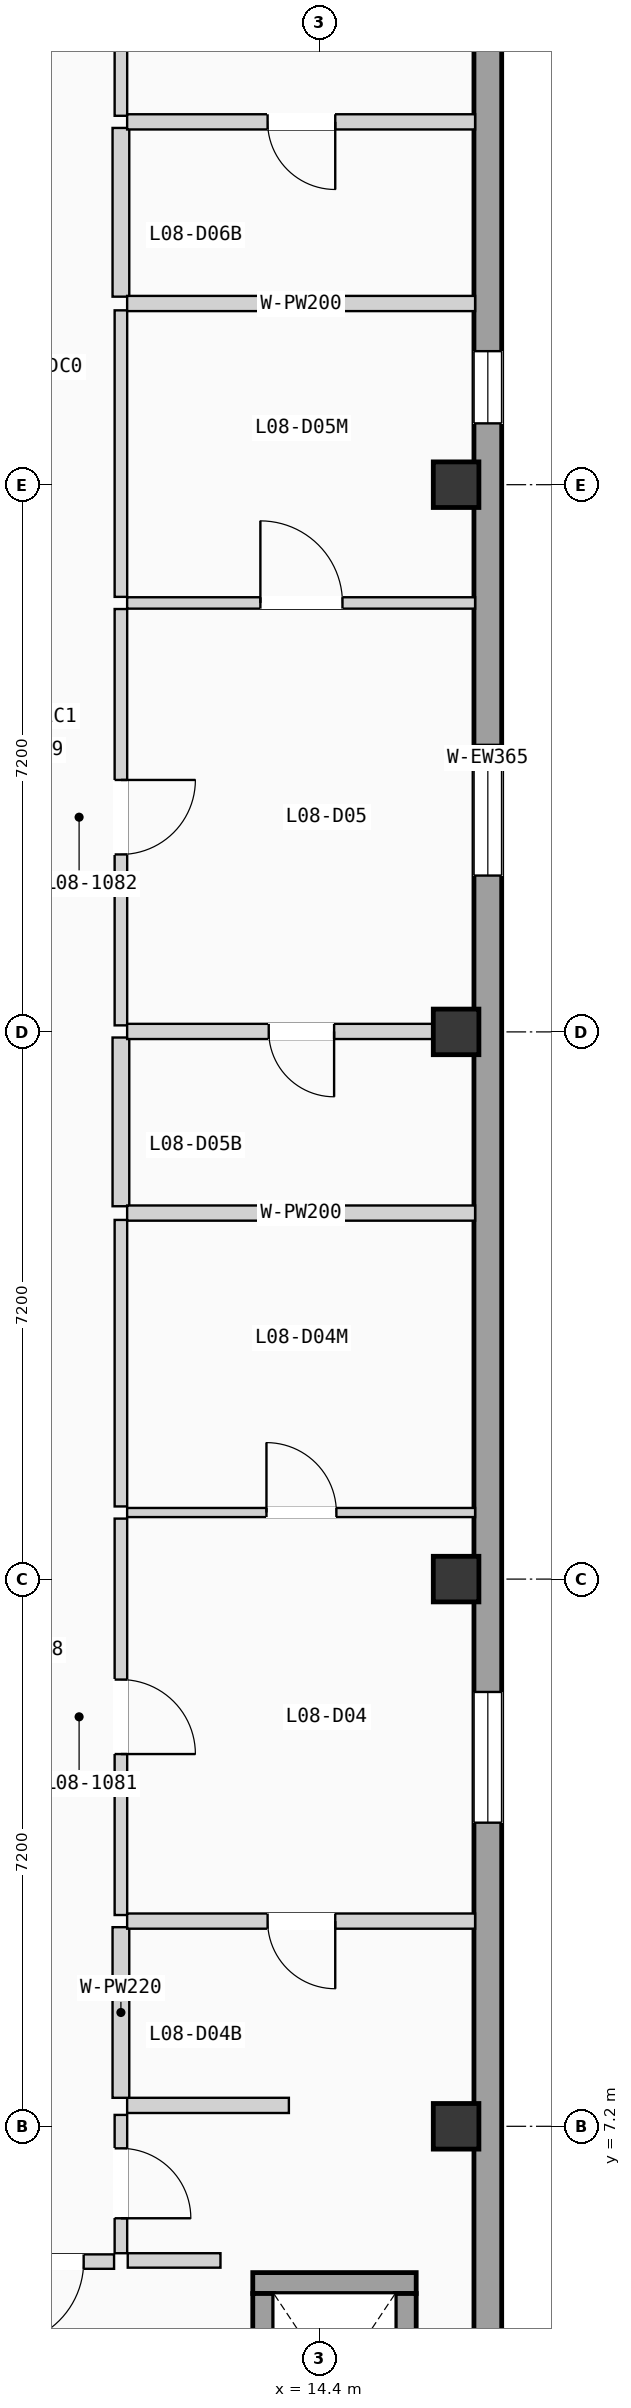
"""IFC4 building model, lengths in metres.
Left out: names, types, materials, properties, quantities, classifications, styles, units other than length and angle.
Written with IfcOpenShell. Run it as: python <this file> out.ifc"""

import sys

from ifc_helpers import new_model, si_unit, direction, frame, frame_2d, origin, origin_2d, place, context, subcontext, project, spatial, rectangle, extrude, element, fill, save


model = new_model("IFC4")
c1 = context("Model", 3, precision=1e-05, world=origin(), true_north=direction((0.0, 1.0)))
c2 = subcontext(c1, "Body", "Model", "MODEL_VIEW")
j1 = project(units=[si_unit("LENGTHUNIT", "METRE"), si_unit("PLANEANGLEUNIT", "RADIAN")], contexts=[c1])
p1 = place(None, origin())
s1 = spatial("IfcSite", under=j1, at=p1, CompositionType="ELEMENT")
p2 = place(p1, origin())
s2 = spatial("IfcBuilding", under=s1, at=p2, CompositionType="ELEMENT")
p3 = place(p2, frame((0.0, 0.0, 27.825)))
s3 = spatial("IfcBuildingStorey", under=s2, at=p3, CompositionType="ELEMENT", Elevation=27.825)
for number, where, z_axis, x_axis in (
    (1, (16.2, 7.2, 0.0), (0.0, 0.0, 1.0), (1.0, 0.0, 0.0)),
    (2, (16.2, 14.4, 0.0), (0.0, 0.0, 1.0), (1.0, 0.0, 0.0)),
    (3, (16.2, 21.6, 0.0), (0.0, 0.0, 1.0), (1.0, 0.0, 0.0)),
    (4, (16.2, 28.8, 0.0), (0.0, 0.0, 1.0), (1.0, 0.0, 0.0)),
):
    element("IfcColumn", number, at=place(p3, frame(where, z_axis=z_axis, x_axis=x_axis)), inside=s3, PredefinedType="COLUMN", context=c2, shape_type="SweptSolid", body=[
        extrude(rectangle(XDim=0.6, YDim=0.6, at=origin_2d()), origin(), (0.0, 0.0, 1.0), 2.85),
    ])
p4 = place(p3, frame((16.617, 0.365, 0.0), z_axis=(0.0, 0.0, 1.0), x_axis=(0.0, 1.0, 0.0)))
e5 = element("IfcWall", 5, at=p4, inside=s3, PredefinedType="SOLIDWALL", context=c2, shape_type="SweptSolid", body=[
    extrude(rectangle(XDim=49.67, YDim=0.365, at=frame_2d((24.835, 0.0))), origin(), (0.0, 0.0, 1.0), 2.55),
])
p5 = place(p4, frame((10.83, 0.0, 0.75)))
e6 = element("IfcOpeningElement", 6, at=p5, cuts=e5, PredefinedType="OPENING", context=c2, shape_type="SweptSolid", body=[
    extrude(rectangle(XDim=1.72, YDim=1.35, at=frame_2d((0.86, 0.675))), frame((0.0, 0.192, 0.0), z_axis=(0.0, -1.0, 0.0), x_axis=(1.0, 0.0, 0.0)), (0.0, 0.0, 1.0), 0.385),
])
p6 = place(p4, frame((23.292, 0.0, 0.665)))
e7 = element("IfcOpeningElement", 7, at=p6, cuts=e5, PredefinedType="OPENING", context=c2, shape_type="SweptSolid", body=[
    extrude(rectangle(XDim=1.72, YDim=1.5, at=frame_2d((0.86, 0.75))), frame((0.0, 0.192, 0.0), z_axis=(0.0, -1.0, 0.0), x_axis=(1.0, 0.0, 0.0)), (0.0, 0.0, 1.0), 0.385),
])
p7 = place(p4, frame((29.242, 0.0, 0.85)))
e8 = element("IfcOpeningElement", 8, at=p7, cuts=e5, PredefinedType="OPENING", context=c2, shape_type="SweptSolid", body=[
    extrude(rectangle(XDim=0.95, YDim=1.2, at=frame_2d((0.475, 0.6))), frame((0.0, 0.192, 0.0), z_axis=(0.0, -1.0, 0.0), x_axis=(1.0, 0.0, 0.0)), (0.0, 0.0, 1.0), 0.385),
])
p8 = place(p4, frame((36.73, 0.0, 0.85)))
e9 = element("IfcOpeningElement", 9, at=p8, cuts=e5, PredefinedType="OPENING", context=c2, shape_type="SweptSolid", body=[
    extrude(rectangle(XDim=0.95, YDim=1.2, at=frame_2d((0.475, 0.6))), frame((0.0, 0.192, 0.0), z_axis=(0.0, -1.0, 0.0), x_axis=(1.0, 0.0, 0.0)), (0.0, 0.0, 1.0), 0.385),
])
p9 = place(p3, frame((13.525, 5.137, 0.0), z_axis=(0.0, 0.0, 1.0), x_axis=(1.0, 0.0, 0.0)))
e10 = element("IfcWall", 10, at=p9, inside=s3, PredefinedType="SHEAR", context=c2, shape_type="SweptSolid", body=[
    extrude(rectangle(XDim=2.15, YDim=0.275, at=frame_2d((1.075, 0.0))), origin(), (0.0, 0.0, 1.0), 2.55),
])
p10 = place(p3, frame((13.663, 2.6, 0.0), z_axis=(0.0, 0.0, 1.0), x_axis=(0.0, 1.0, 0.0)))
e11 = element("IfcWall", 11, at=p10, inside=s3, PredefinedType="SHEAR", context=c2, shape_type="SweptSolid", body=[
    extrude(rectangle(XDim=2.4, YDim=0.275, at=frame_2d((1.2, 0.0))), origin(), (0.0, 0.0, 1.0), 2.55),
])
p11 = place(p10, frame((0.65, 0.0, 0.0)))
e12 = element("IfcOpeningElement", 12, at=p11, cuts=e11, PredefinedType="OPENING", context=c2, shape_type="SweptSolid", body=[
    extrude(rectangle(XDim=1.1, YDim=2.15, at=frame_2d((0.55, 1.075))), frame((0.0, 0.147, 0.0), z_axis=(0.0, -1.0, 0.0), x_axis=(1.0, 0.0, 0.0)), (0.0, 0.0, 1.0), 0.295),
])
p12 = place(p3, frame((15.538, 2.6, 0.0), z_axis=(0.0, 0.0, 1.0), x_axis=(0.0, 1.0, 0.0)))
e13 = element("IfcWall", 13, at=p12, inside=s3, PredefinedType="SHEAR", context=c2, shape_type="SweptSolid", body=[
    extrude(rectangle(XDim=2.4, YDim=0.275, at=frame_2d((1.2, 0.0))), origin(), (0.0, 0.0, 1.0), 2.55),
])
p13 = place(p3, frame((11.88, 5.435, 0.0), z_axis=(0.0, 0.0, 1.0), x_axis=(1.0, 0.0, 0.0)))
e14 = element("IfcWall", 14, at=p13, inside=s3, PredefinedType="PARTITIONING", context=c2, shape_type="SweptSolid", body=[
    extrude(rectangle(XDim=1.22, YDim=0.19, at=frame_2d((0.61, 0.0))), origin(), (0.0, 0.0, 1.0), 2.39),
])
p14 = place(p3, frame((9.7, 5.42, 0.0), z_axis=(0.0, 0.0, 1.0), x_axis=(1.0, 0.0, 0.0)))
e15 = element("IfcWall", 15, at=p14, inside=s3, PredefinedType="PARTITIONING", context=c2, shape_type="SweptSolid", body=[
    extrude(rectangle(XDim=2.0, YDim=0.19, at=frame_2d((1.0, 0.0))), origin(), (0.0, 0.0, 1.0), 2.39),
])
p15 = place(p14, frame((0.5, 0.0, 0.0)))
e16 = element("IfcOpeningElement", 16, at=p15, cuts=e15, PredefinedType="OPENING", context=c2, shape_type="SweptSolid", body=[
    extrude(rectangle(XDim=1.1, YDim=2.12, at=frame_2d((0.55, 1.06))), frame((0.0, 0.105, 0.0), z_axis=(0.0, -1.0, 0.0), x_axis=(1.0, 0.0, 0.0)), (0.0, 0.0, 1.0), 0.21),
])
p16 = place(p3, frame((11.79, 5.53, 0.0), z_axis=(0.0, 0.0, 1.0), x_axis=(0.0, 1.0, 0.0)))
e17 = element("IfcWall", 17, at=p16, inside=s3, PredefinedType="PARTITIONING", context=c2, shape_type="SweptSolid", body=[
    extrude(rectangle(XDim=1.82, YDim=0.165, at=frame_2d((0.91, 0.0))), origin(), (0.0, 0.0, 1.0), 2.39),
])
p17 = place(p16, frame((0.46, 0.0, 0.0)))
e18 = element("IfcOpeningElement", 18, at=p17, cuts=e17, PredefinedType="OPENING", context=c2, shape_type="SweptSolid", body=[
    extrude(rectangle(XDim=0.92, YDim=2.04, at=frame_2d((0.46, 1.02))), frame((0.0, 0.093, 0.0), z_axis=(0.0, -1.0, 0.0), x_axis=(1.0, 0.0, 0.0)), (0.0, 0.0, 1.0), 0.185),
])
p18 = place(p3, frame((11.872, 7.475, 0.0), z_axis=(0.0, 0.0, 1.0), x_axis=(1.0, 0.0, 0.0)))
e19 = element("IfcWall", 19, at=p18, inside=s3, PredefinedType="PLUMBINGWALL", context=c2, shape_type="SweptSolid", body=[
    extrude(rectangle(XDim=2.128, YDim=0.2, at=frame_2d((1.064, 0.0))), origin(), (0.0, 0.0, 1.0), 2.12),
])
p19 = place(p3, frame((11.79, 7.575, 0.0), z_axis=(0.0, 0.0, 1.0), x_axis=(0.0, 1.0, 0.0)))
e20 = element("IfcWall", 20, at=p19, inside=s3, PredefinedType="PLUMBINGWALL", context=c2, shape_type="SweptSolid", body=[
    extrude(rectangle(XDim=2.245, YDim=0.22, at=frame_2d((1.123, 0.0))), origin(), (0.0, 0.0, 1.0), 2.39),
])
p20 = place(p3, frame((11.79, 9.98, 0.0), z_axis=(0.0, 0.0, 1.0), x_axis=(0.0, 1.0, 0.0)))
e21 = element("IfcWall", 21, at=p20, inside=s3, PredefinedType="PARTITIONING", context=c2, shape_type="SweptSolid", body=[
    extrude(rectangle(XDim=5.216, YDim=0.165, at=frame_2d((2.608, 0.0))), origin(), (0.0, 0.0, 1.0), 2.39),
])
p21 = place(p20, frame((2.118, 0.0, 0.0)))
e22 = element("IfcOpeningElement", 22, at=p21, cuts=e21, PredefinedType="OPENING", context=c2, shape_type="SweptSolid", body=[
    extrude(rectangle(XDim=0.98, YDim=2.08, at=frame_2d((0.49, 1.04))), frame((0.0, 0.093, 0.0), z_axis=(0.0, -1.0, 0.0), x_axis=(1.0, 0.0, 0.0)), (0.0, 0.0, 1.0), 0.185),
])
p22 = place(p3, frame((11.79, 15.356, 0.0), z_axis=(0.0, 0.0, 1.0), x_axis=(0.0, 1.0, 0.0)))
e23 = element("IfcWall", 23, at=p22, inside=s3, PredefinedType="PARTITIONING", context=c2, shape_type="SweptSolid", body=[
    extrude(rectangle(XDim=3.77, YDim=0.165, at=frame_2d((1.885, 0.0))), origin(), (0.0, 0.0, 1.0), 2.39),
])
p23 = place(p3, frame((11.79, 19.306, 0.0), z_axis=(0.0, 0.0, 1.0), x_axis=(0.0, 1.0, 0.0)))
e24 = element("IfcWall", 24, at=p23, inside=s3, PredefinedType="PLUMBINGWALL", context=c2, shape_type="SweptSolid", body=[
    extrude(rectangle(XDim=2.22, YDim=0.22, at=frame_2d((1.11, 0.0))), origin(), (0.0, 0.0, 1.0), 2.39),
])
p24 = place(p3, frame((11.79, 21.686, 0.0), z_axis=(0.0, 0.0, 1.0), x_axis=(0.0, 1.0, 0.0)))
e25 = element("IfcWall", 25, at=p24, inside=s3, PredefinedType="PARTITIONING", context=c2, shape_type="SweptSolid", body=[
    extrude(rectangle(XDim=5.478, YDim=0.165, at=frame_2d((2.739, 0.0))), origin(), (0.0, 0.0, 1.0), 2.39),
])
p25 = place(p24, frame((2.249, 0.0, 0.0)))
e26 = element("IfcOpeningElement", 26, at=p25, cuts=e25, PredefinedType="OPENING", context=c2, shape_type="SweptSolid", body=[
    extrude(rectangle(XDim=0.98, YDim=2.08, at=frame_2d((0.49, 1.04))), frame((0.0, 0.093, 0.0), z_axis=(0.0, -1.0, 0.0), x_axis=(1.0, 0.0, 0.0)), (0.0, 0.0, 1.0), 0.185),
])
p26 = place(p3, frame((11.79, 27.324, 0.0), z_axis=(0.0, 0.0, 1.0), x_axis=(0.0, 1.0, 0.0)))
e27 = element("IfcWall", 27, at=p26, inside=s3, PredefinedType="PARTITIONING", context=c2, shape_type="SweptSolid", body=[
    extrude(rectangle(XDim=3.77, YDim=0.165, at=frame_2d((1.885, 0.0))), origin(), (0.0, 0.0, 1.0), 2.39),
])
p27 = place(p3, frame((11.79, 31.274, 0.0), z_axis=(0.0, 0.0, 1.0), x_axis=(0.0, 1.0, 0.0)))
e28 = element("IfcWall", 28, at=p27, inside=s3, PredefinedType="PLUMBINGWALL", context=c2, shape_type="SweptSolid", body=[
    extrude(rectangle(XDim=2.22, YDim=0.22, at=frame_2d((1.11, 0.0))), origin(), (0.0, 0.0, 1.0), 2.39),
])
p28 = place(p3, frame((11.79, 33.654, 0.0), z_axis=(0.0, 0.0, 1.0), x_axis=(0.0, 1.0, 0.0)))
e29 = element("IfcWall", 29, at=p28, inside=s3, PredefinedType="PARTITIONING", context=c2, shape_type="SweptSolid", body=[
    extrude(rectangle(XDim=5.216, YDim=0.165, at=frame_2d((2.608, 0.0))), origin(), (0.0, 0.0, 1.0), 2.39),
])
p29 = place(p28, frame((2.118, 0.0, 0.0)))
e30 = element("IfcOpeningElement", 30, at=p29, cuts=e29, PredefinedType="OPENING", context=c2, shape_type="SweptSolid", body=[
    extrude(rectangle(XDim=0.98, YDim=2.08, at=frame_2d((0.49, 1.04))), frame((0.0, 0.093, 0.0), z_axis=(0.0, -1.0, 0.0), x_axis=(1.0, 0.0, 0.0)), (0.0, 0.0, 1.0), 0.185),
])
p30 = place(p3, frame((11.872, 9.9, 0.0), z_axis=(0.0, 0.0, 1.0), x_axis=(1.0, 0.0, 0.0)))
e31 = element("IfcWall", 31, at=p30, inside=s3, PredefinedType="PLUMBINGWALL", context=c2, shape_type="SweptSolid", body=[
    extrude(rectangle(XDim=4.578, YDim=0.2, at=frame_2d((2.289, 0.0))), origin(), (0.0, 0.0, 1.0), 2.39),
])
p31 = place(p30, frame((1.848, 0.0, 0.0)))
e32 = element("IfcOpeningElement", 32, at=p31, cuts=e31, PredefinedType="OPENING", context=c2, shape_type="SweptSolid", body=[
    extrude(rectangle(XDim=0.89, YDim=2.03, at=frame_2d((0.445, 1.015))), frame((0.0, 0.11, 0.0), z_axis=(0.0, -1.0, 0.0), x_axis=(1.0, 0.0, 0.0)), (0.0, 0.0, 1.0), 0.22),
])
p32 = place(p3, frame((11.872, 15.276, 0.0), z_axis=(0.0, 0.0, 1.0), x_axis=(1.0, 0.0, 0.0)))
e33 = element("IfcWall", 33, at=p32, inside=s3, PredefinedType="PARTITIONING", context=c2, shape_type="SweptSolid", body=[
    extrude(rectangle(XDim=4.578, YDim=0.12, at=frame_2d((2.289, 0.0))), origin(), (0.0, 0.0, 1.0), 2.39),
])
p33 = place(p32, frame((1.833, 0.0, 0.0)))
e34 = element("IfcOpeningElement", 34, at=p33, cuts=e33, PredefinedType="OPENING", context=c2, shape_type="SweptSolid", body=[
    extrude(rectangle(XDim=0.92, YDim=2.02, at=frame_2d((0.46, 1.01))), frame((0.0, 0.07, 0.0), z_axis=(0.0, -1.0, 0.0), x_axis=(1.0, 0.0, 0.0)), (0.0, 0.0, 1.0), 0.14),
])
p34 = place(p3, frame((11.872, 19.216, 0.0), z_axis=(0.0, 0.0, 1.0), x_axis=(1.0, 0.0, 0.0)))
e35 = element("IfcWall", 35, at=p34, inside=s3, PredefinedType="PLUMBINGWALL", context=c2, shape_type="SweptSolid", body=[
    extrude(rectangle(XDim=4.578, YDim=0.2, at=frame_2d((2.289, 0.0))), origin(), (0.0, 0.0, 1.0), 2.39),
])
p35 = place(p3, frame((11.872, 21.606, 0.0), z_axis=(0.0, 0.0, 1.0), x_axis=(1.0, 0.0, 0.0)))
e36 = element("IfcWall", 36, at=p35, inside=s3, PredefinedType="PLUMBINGWALL", context=c2, shape_type="SweptSolid", body=[
    extrude(rectangle(XDim=4.578, YDim=0.2, at=frame_2d((2.289, 0.0))), origin(), (0.0, 0.0, 1.0), 2.12),
])
p36 = place(p35, frame((1.863, 0.0, 0.0)))
e37 = element("IfcOpeningElement", 37, at=p36, cuts=e36, PredefinedType="OPENING", context=c2, shape_type="SweptSolid", body=[
    extrude(rectangle(XDim=0.86, YDim=2.0, at=frame_2d((0.43, 1.0))), frame((0.0, 0.11, 0.0), z_axis=(0.0, -1.0, 0.0), x_axis=(1.0, 0.0, 0.0)), (0.0, 0.0, 1.0), 0.22),
])
p37 = place(p3, frame((11.872, 27.244, 0.0), z_axis=(0.0, 0.0, 1.0), x_axis=(1.0, 0.0, 0.0)))
e38 = element("IfcWall", 38, at=p37, inside=s3, PredefinedType="PARTITIONING", context=c2, shape_type="SweptSolid", body=[
    extrude(rectangle(XDim=4.578, YDim=0.15, at=frame_2d((2.289, 0.0))), origin(), (0.0, 0.0, 1.0), 2.39),
])
p38 = place(p37, frame((1.753, 0.0, 0.0)))
e39 = element("IfcOpeningElement", 39, at=p38, cuts=e38, PredefinedType="OPENING", context=c2, shape_type="SweptSolid", body=[
    extrude(rectangle(XDim=1.08, YDim=2.1, at=frame_2d((0.54, 1.05))), frame((0.0, 0.085, 0.0), z_axis=(0.0, -1.0, 0.0), x_axis=(1.0, 0.0, 0.0)), (0.0, 0.0, 1.0), 0.17),
])
p39 = place(p3, frame((11.872, 31.184, 0.0), z_axis=(0.0, 0.0, 1.0), x_axis=(1.0, 0.0, 0.0)))
e40 = element("IfcWall", 40, at=p39, inside=s3, PredefinedType="PLUMBINGWALL", context=c2, shape_type="SweptSolid", body=[
    extrude(rectangle(XDim=4.578, YDim=0.2, at=frame_2d((2.289, 0.0))), origin(), (0.0, 0.0, 1.0), 2.39),
])
p40 = place(p3, frame((11.872, 33.574, 0.0), z_axis=(0.0, 0.0, 1.0), x_axis=(1.0, 0.0, 0.0)))
e41 = element("IfcWall", 41, at=p40, inside=s3, PredefinedType="PLUMBINGWALL", context=c2, shape_type="SweptSolid", body=[
    extrude(rectangle(XDim=4.578, YDim=0.2, at=frame_2d((2.289, 0.0))), origin(), (0.0, 0.0, 1.0), 2.39),
])
p41 = place(p40, frame((1.848, 0.0, 0.0)))
e42 = element("IfcOpeningElement", 42, at=p41, cuts=e41, PredefinedType="OPENING", context=c2, shape_type="SweptSolid", body=[
    extrude(rectangle(XDim=0.89, YDim=2.03, at=frame_2d((0.445, 1.015))), frame((0.0, 0.11, 0.0), z_axis=(0.0, -1.0, 0.0), x_axis=(1.0, 0.0, 0.0)), (0.0, 0.0, 1.0), 0.22),
])
p42 = place(p5, origin())
e43 = element("IfcWindow", 43, at=p42, inside=s3, PartitioningType="DOUBLE_PANEL_VERTICAL", PredefinedType="WINDOW", context=c2, shape_type="SweptSolid", body=[
    extrude(rectangle(XDim=1.72, YDim=1.35, at=frame_2d((0.86, 0.675))), frame((0.0, 0.03, 0.0), z_axis=(0.0, -1.0, 0.0), x_axis=(1.0, 0.0, 0.0)), (0.0, 0.0, 1.0), 0.06),
])
fill(e6, e43)
p43 = place(p6, origin())
e44 = element("IfcWindow", 44, at=p43, inside=s3, PartitioningType="DOUBLE_PANEL_VERTICAL", PredefinedType="WINDOW", context=c2, shape_type="SweptSolid", body=[
    extrude(rectangle(XDim=1.72, YDim=1.5, at=frame_2d((0.86, 0.75))), frame((0.0, 0.03, 0.0), z_axis=(0.0, -1.0, 0.0), x_axis=(1.0, 0.0, 0.0)), (0.0, 0.0, 1.0), 0.06),
])
fill(e7, e44)
p44 = place(p7, origin())
e45 = element("IfcWindow", 45, at=p44, inside=s3, PartitioningType="SINGLE_PANEL", PredefinedType="WINDOW", context=c2, shape_type="SweptSolid", body=[
    extrude(rectangle(XDim=0.95, YDim=1.2, at=frame_2d((0.475, 0.6))), frame((0.0, 0.03, 0.0), z_axis=(0.0, -1.0, 0.0), x_axis=(1.0, 0.0, 0.0)), (0.0, 0.0, 1.0), 0.06),
])
fill(e8, e45)
p45 = place(p15, frame((1.1, 0.0, 0.0), z_axis=(0.0, 0.0, 1.0), x_axis=(-1.0, 0.0, 0.0)))
e46 = element("IfcDoor", 46, at=p45, inside=s3, OperationType="SINGLE_SWING_LEFT", PredefinedType="DOOR", context=c2, shape_type="SweptSolid", body=[
    extrude(rectangle(XDim=1.1, YDim=2.12, at=frame_2d((0.55, 1.06))), frame((0.0, 0.025, 0.0), z_axis=(0.0, -1.0, 0.0), x_axis=(1.0, 0.0, 0.0)), (0.0, 0.0, 1.0), 0.05),
])
fill(e16, e46)
p46 = place(p17, frame((0.92, 0.0, 0.0), z_axis=(0.0, 0.0, 1.0), x_axis=(-1.0, 0.0, 0.0)))
e47 = element("IfcDoor", 47, at=p46, inside=s3, OperationType="SINGLE_SWING_LEFT", PredefinedType="DOOR", context=c2, shape_type="SweptSolid", body=[
    extrude(rectangle(XDim=0.92, YDim=2.04, at=frame_2d((0.46, 1.02))), frame((0.0, 0.025, 0.0), z_axis=(0.0, -1.0, 0.0), x_axis=(1.0, 0.0, 0.0)), (0.0, 0.0, 1.0), 0.05),
])
fill(e18, e47)
p47 = place(p21, frame((0.98, 0.0, 0.0), z_axis=(0.0, 0.0, 1.0), x_axis=(-1.0, 0.0, 0.0)))
e48 = element("IfcDoor", 48, at=p47, inside=s3, OperationType="SINGLE_SWING_LEFT", PredefinedType="DOOR", context=c2, shape_type="SweptSolid", body=[
    extrude(rectangle(XDim=0.98, YDim=2.08, at=frame_2d((0.49, 1.04))), frame((0.0, 0.025, 0.0), z_axis=(0.0, -1.0, 0.0), x_axis=(1.0, 0.0, 0.0)), (0.0, 0.0, 1.0), 0.05),
])
fill(e22, e48)
p48 = place(p25, frame((0.98, 0.0, 0.0), z_axis=(0.0, 0.0, 1.0), x_axis=(-1.0, 0.0, 0.0)))
e49 = element("IfcDoor", 49, at=p48, inside=s3, OperationType="SINGLE_SWING_RIGHT", PredefinedType="DOOR", context=c2, shape_type="SweptSolid", body=[
    extrude(rectangle(XDim=0.98, YDim=2.08, at=frame_2d((0.49, 1.04))), frame((0.0, 0.025, 0.0), z_axis=(0.0, -1.0, 0.0), x_axis=(1.0, 0.0, 0.0)), (0.0, 0.0, 1.0), 0.05),
])
fill(e26, e49)
p49 = place(p31, frame((0.89, 0.0, 0.0), z_axis=(0.0, 0.0, 1.0), x_axis=(-1.0, 0.0, 0.0)))
e50 = element("IfcDoor", 50, at=p49, inside=s3, OperationType="SINGLE_SWING_RIGHT", PredefinedType="DOOR", context=c2, shape_type="SweptSolid", body=[
    extrude(rectangle(XDim=0.89, YDim=2.03, at=frame_2d((0.445, 1.015))), frame((0.0, 0.025, 0.0), z_axis=(0.0, -1.0, 0.0), x_axis=(1.0, 0.0, 0.0)), (0.0, 0.0, 1.0), 0.05),
])
fill(e32, e50)
p50 = place(p33, origin())
e51 = element("IfcDoor", 51, at=p50, inside=s3, OperationType="SINGLE_SWING_LEFT", PredefinedType="DOOR", context=c2, shape_type="SweptSolid", body=[
    extrude(rectangle(XDim=0.92, YDim=2.02, at=frame_2d((0.46, 1.01))), frame((0.0, 0.025, 0.0), z_axis=(0.0, -1.0, 0.0), x_axis=(1.0, 0.0, 0.0)), (0.0, 0.0, 1.0), 0.05),
])
fill(e34, e51)
p51 = place(p36, frame((0.86, 0.0, 0.0), z_axis=(0.0, 0.0, 1.0), x_axis=(-1.0, 0.0, 0.0)))
e52 = element("IfcDoor", 52, at=p51, inside=s3, OperationType="SINGLE_SWING_RIGHT", PredefinedType="DOOR", context=c2, shape_type="SweptSolid", body=[
    extrude(rectangle(XDim=0.86, YDim=2.0, at=frame_2d((0.43, 1.0))), frame((0.0, 0.025, 0.0), z_axis=(0.0, -1.0, 0.0), x_axis=(1.0, 0.0, 0.0)), (0.0, 0.0, 1.0), 0.05),
])
fill(e37, e52)
p52 = place(p38, origin())
e53 = element("IfcDoor", 53, at=p52, inside=s3, OperationType="SINGLE_SWING_LEFT", PredefinedType="DOOR", context=c2, shape_type="SweptSolid", body=[
    extrude(rectangle(XDim=1.08, YDim=2.1, at=frame_2d((0.54, 1.05))), frame((0.0, 0.025, 0.0), z_axis=(0.0, -1.0, 0.0), x_axis=(1.0, 0.0, 0.0)), (0.0, 0.0, 1.0), 0.05),
])
fill(e39, e53)
p53 = place(p41, frame((0.89, 0.0, 0.0), z_axis=(0.0, 0.0, 1.0), x_axis=(-1.0, 0.0, 0.0)))
e54 = element("IfcDoor", 54, at=p53, inside=s3, OperationType="SINGLE_SWING_RIGHT", PredefinedType="DOOR", context=c2, shape_type="SweptSolid", body=[
    extrude(rectangle(XDim=0.89, YDim=2.03, at=frame_2d((0.445, 1.015))), frame((0.0, 0.025, 0.0), z_axis=(0.0, -1.0, 0.0), x_axis=(1.0, 0.0, 0.0)), (0.0, 0.0, 1.0), 0.05),
])
fill(e42, e54)
save(model, sys.argv[1])
